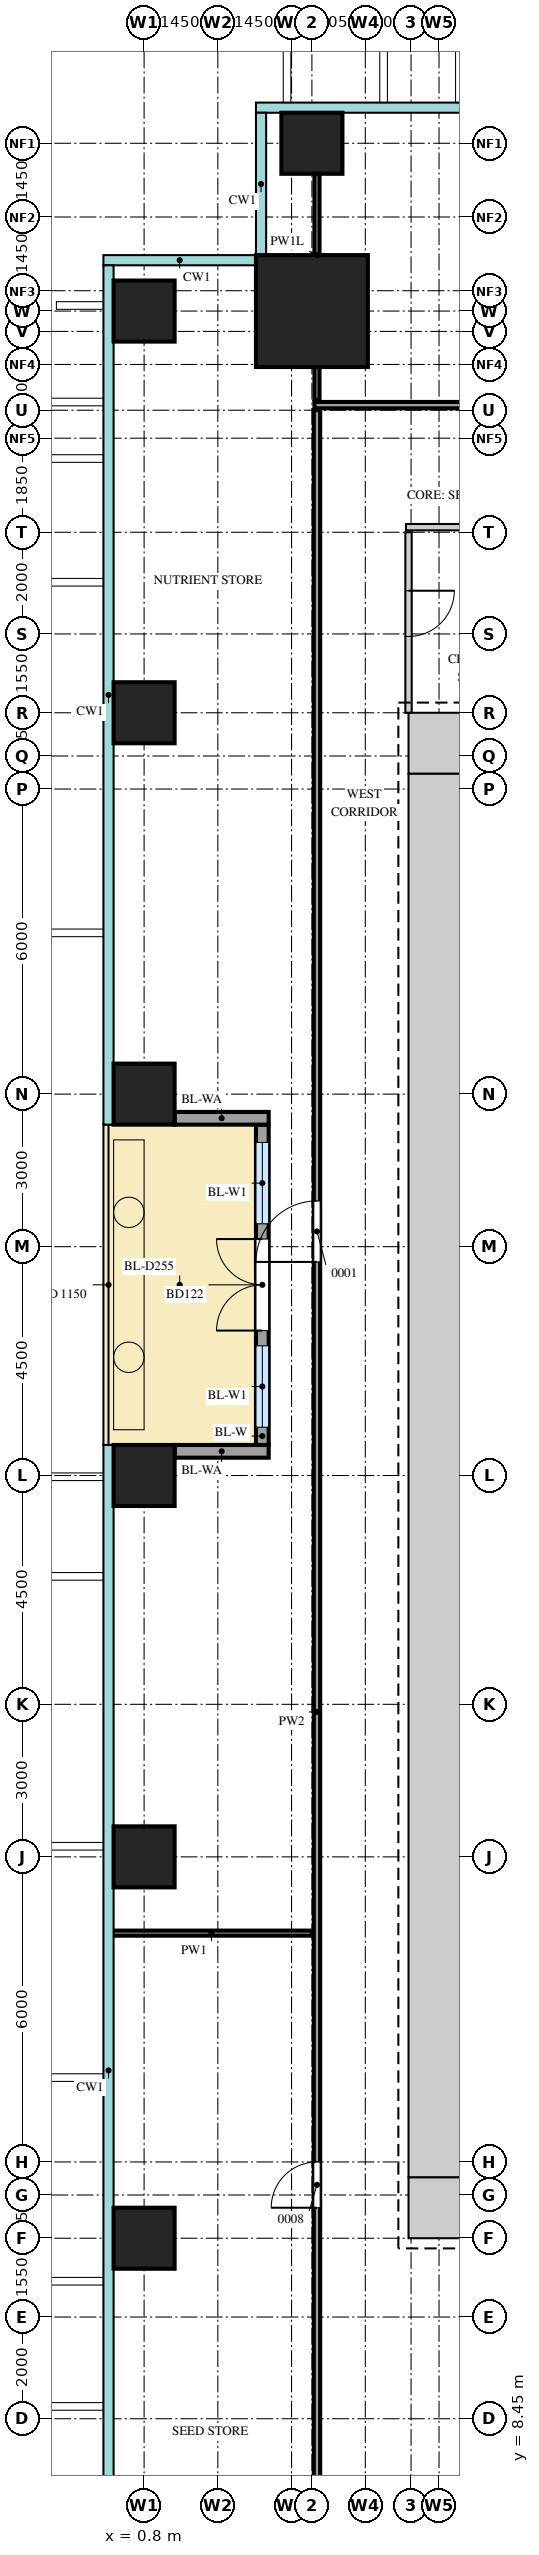
"""IFC4 building model, lengths in metres.
Left out: names, types, materials, properties, quantities, classifications, styles, units other than length and angle.
Written with IfcOpenShell. Run it as: python <this file> out.ifc"""

import sys

from ifc_helpers import new_model, si_unit, direction, frame, frame_2d, origin, origin_2d, place, context, subcontext, project, spatial, rectangle, extrude, source, transform, mapped, element, fill, save


model = new_model("IFC4")
c1 = context("Model", 3, precision=1e-05, world=origin(), true_north=direction((0.0, 1.0)))
c2 = subcontext(c1, "Body", "Model", "MODEL_VIEW")
j1 = project(units=[si_unit("LENGTHUNIT", "METRE"), si_unit("PLANEANGLEUNIT", "RADIAN")], contexts=[c1])
p1 = place(None, origin())
s1 = spatial("IfcSite", under=j1, at=p1, CompositionType="ELEMENT")
p2 = place(p1, origin())
s2 = spatial("IfcBuilding", under=s1, at=p2, CompositionType="ELEMENT")
p3 = place(p2, frame((0.0, 0.0, 60.0)))
s3 = spatial("IfcBuildingStorey", under=s2, at=p3, CompositionType="ELEMENT", Elevation=60.0)
m1 = source(origin(), c2, "Body", "SweptSolid", [
    extrude(rectangle(XDim=1.2, YDim=1.2, at=frame_2d((0.6, 0.0))), origin(), (0.0, 0.0, 1.0), 4.2),
])
for number, where, z_axis, x_axis in (
    (1, (6.0, 41.4, 0.0), (0.0, 0.0, 1.0), (1.0, 0.0, 0.0)),
    (2, (6.0, 12.6, 0.0), (0.0, 0.0, 1.0), (1.0, 0.0, 0.0)),
):
    element("IfcWall", number, at=place(p3, frame(where, z_axis=z_axis, x_axis=x_axis)), inside=s3, PredefinedType="SHEAR", context=c2, shape_type="MappedRepresentation", body=[
        mapped(m1, transform((0.0, 0.0, 0.0))),
    ])
m2 = source(origin(), c2, "Body", "SweptSolid", [
    extrude(rectangle(XDim=27.6, YDim=1.2, at=frame_2d((13.8, 0.0))), origin(), (0.0, 0.0, 1.0), 4.2),
])
p4 = place(p3, frame((6.6, 13.2, 0.0), z_axis=(0.0, 0.0, 1.0), x_axis=(0.0, 1.0, 0.0)))
e3 = element("IfcWall", 3, at=p4, inside=s3, PredefinedType="SHEAR", context=c2, shape_type="MappedRepresentation", body=[
    mapped(m2, transform((0.0, 0.0, 0.0))),
])
m3 = source(origin(), c2, "Body", "SweptSolid", [
    extrude(rectangle(XDim=2.2, YDim=2.2, at=origin_2d()), origin(), (0.0, 0.0, 1.0), 4.5),
])
p5 = place(p3, frame((4.1, 49.9, 0.0), z_axis=(0.0, 0.0, 1.0), x_axis=(1.0, 0.0, 0.0)))
e4 = element("IfcColumn", 4, at=p5, inside=s3, PredefinedType="COLUMN", context=c2, shape_type="MappedRepresentation", body=[
    mapped(m3, transform((0.0, 0.0, 0.0))),
])
m4 = source(origin(), c2, "Body", "SweptSolid", [
    extrude(rectangle(XDim=1.2, YDim=1.2, at=origin_2d()), origin(), (0.0, 0.0, 1.0), 4.2),
])
for number, where, z_axis, x_axis in (
    (5, (4.1, 53.2, 0.0), (0.0, 0.0, 1.0), (1.0, 0.0, 0.0)),
    (6, (0.8, 12.0, 0.0), (0.0, 0.0, 1.0), (1.0, 0.0, 0.0)),
    (7, (0.8, 19.5, 0.0), (0.0, 0.0, 1.0), (1.0, 0.0, 0.0)),
    (8, (0.8, 27.0, 0.0), (0.0, 0.0, 1.0), (1.0, 0.0, 0.0)),
    (9, (0.8, 34.5, 0.0), (0.0, 0.0, 1.0), (1.0, 0.0, 0.0)),
    (10, (0.8, 42.0, 0.0), (0.0, 0.0, 1.0), (1.0, 0.0, 0.0)),
    (11, (0.8, 49.9, 0.0), (0.0, 0.0, 1.0), (1.0, 0.0, 0.0)),
):
    element("IfcColumn", number, at=place(p3, frame(where, z_axis=z_axis, x_axis=x_axis)), inside=s3, PredefinedType="COLUMN", context=c2, shape_type="MappedRepresentation", body=[
        mapped(m4, transform((0.0, 0.0, 0.0))),
    ])
m5 = source(origin(), c2, "Body", "SweptSolid", [
    extrude(rectangle(XDim=6.3, YDim=0.25, at=frame_2d((3.15, 0.0))), origin(), (0.0, 0.0, 1.0), 4.2),
])
p6 = place(p3, frame((3.125, 27.6, 0.0), z_axis=(0.0, 0.0, 1.0), x_axis=(0.0, 1.0, 0.0)))
e12 = element("IfcWall", 12, at=p6, inside=s3, PredefinedType="SOLIDWALL", context=c2, shape_type="MappedRepresentation", body=[
    mapped(m5, transform((0.0, 0.0, 0.0))),
])
m6 = source(origin(), c2, "Body", "SweptSolid", [
    extrude(rectangle(XDim=1.6, YDim=2.4, at=frame_2d((0.8, 1.2))), frame((0.0, 0.135, 0.0), z_axis=(0.0, -1.0, 0.0), x_axis=(1.0, 0.0, 0.0)), (0.0, 0.0, 1.0), 0.27),
])
p7 = place(p6, frame((0.35, 0.0, 0.0)))
e13 = element("IfcOpeningElement", 13, at=p7, cuts=e12, PredefinedType="OPENING", context=c2, shape_type="MappedRepresentation", body=[
    mapped(m6, transform((0.0, 0.0, 0.0))),
])
p8 = place(p6, frame((4.35, 0.0, 0.0)))
e14 = element("IfcOpeningElement", 14, at=p8, cuts=e12, PredefinedType="OPENING", context=c2, shape_type="MappedRepresentation", body=[
    mapped(m6, transform((0.0, 0.0, 0.0))),
])
m7 = source(origin(), c2, "Body", "SweptSolid", [
    extrude(rectangle(XDim=1.8, YDim=2.4, at=frame_2d((0.9, 1.2))), frame((0.0, 0.135, 0.0), z_axis=(0.0, -1.0, 0.0), x_axis=(1.0, 0.0, 0.0)), (0.0, 0.0, 1.0), 0.27),
])
p9 = place(p6, frame((2.25, 0.0, 0.0)))
e15 = element("IfcOpeningElement", 15, at=p9, cuts=e12, PredefinedType="OPENING", context=c2, shape_type="MappedRepresentation", body=[
    mapped(m7, transform((0.0, 0.0, 0.0))),
])
m8 = source(origin(), c2, "Body", "SweptSolid", [
    extrude(rectangle(XDim=1.85, YDim=0.25, at=frame_2d((0.925, 0.0))), origin(), (0.0, 0.0, 1.0), 3.9),
])
for number, where, z_axis, x_axis in (
    (16, (1.4, 27.475, 0.0), (0.0, 0.0, 1.0), (1.0, 0.0, 0.0)),
    (17, (1.4, 34.025, 0.0), (0.0, 0.0, 1.0), (1.0, 0.0, 0.0)),
):
    element("IfcWall", number, at=place(p3, frame(where, z_axis=z_axis, x_axis=x_axis)), inside=s3, PredefinedType="SOLIDWALL", context=c2, shape_type="MappedRepresentation", body=[
        mapped(m8, transform((0.0, 0.0, 0.0))),
    ])
m9 = source(origin(), c2, "Body", "SweptSolid", [
    extrude(rectangle(XDim=41.8, YDim=0.125, at=frame_2d((20.9, 0.0))), origin(), (0.0, 0.0, 1.0), 4.3),
])
p10 = place(p3, frame((4.2, 6.15, 0.0), z_axis=(0.0, 0.0, 1.0), x_axis=(0.0, 1.0, 0.0)))
e18 = element("IfcWall", 18, at=p10, inside=s3, PredefinedType="PARTITIONING", context=c2, shape_type="MappedRepresentation", body=[
    mapped(m9, transform((0.0, 0.0, 0.0))),
])
m10 = source(origin(), c2, "Body", "SweptSolid", [
    extrude(rectangle(XDim=0.9, YDim=2.1, at=frame_2d((0.45, 1.05))), frame((0.0, 0.073, 0.0), z_axis=(0.0, -1.0, 0.0), x_axis=(1.0, 0.0, 0.0)), (0.0, 0.0, 1.0), 0.145),
])
p11 = place(p10, frame((6.45, 0.0, 0.0)))
e19 = element("IfcOpeningElement", 19, at=p11, cuts=e18, PredefinedType="OPENING", context=c2, shape_type="MappedRepresentation", body=[
    mapped(m10, transform((0.0, 0.0, 0.0))),
])
m11 = source(origin(), c2, "Body", "SweptSolid", [
    extrude(rectangle(XDim=1.2, YDim=2.1, at=frame_2d((0.6, 1.05))), frame((0.0, 0.073, 0.0), z_axis=(0.0, -1.0, 0.0), x_axis=(1.0, 0.0, 0.0)), (0.0, 0.0, 1.0), 0.145),
])
p12 = place(p10, frame((25.05, 0.0, 0.0)))
e20 = element("IfcOpeningElement", 20, at=p12, cuts=e18, PredefinedType="OPENING", context=c2, shape_type="MappedRepresentation", body=[
    mapped(m11, transform((0.0, 0.0, 0.0))),
])
m12 = source(origin(), c2, "Body", "SweptSolid", [
    extrude(rectangle(XDim=3.95, YDim=0.1, at=frame_2d((1.975, 0.0))), origin(), (0.0, 0.0, 1.0), 4.3),
])
p13 = place(p3, frame((0.15, 18.0, 0.0), z_axis=(0.0, 0.0, 1.0), x_axis=(1.0, 0.0, 0.0)))
e21 = element("IfcWall", 21, at=p13, inside=s3, PredefinedType="PARTITIONING", context=c2, shape_type="MappedRepresentation", body=[
    mapped(m12, transform((0.0, 0.0, 0.0))),
])
m13 = source(origin(), c2, "Body", "SweptSolid", [
    extrude(rectangle(XDim=3.55, YDim=0.125, at=frame_2d((1.775, 0.0))), origin(), (0.0, 0.0, 1.0), 4.3),
])
p14 = place(p3, frame((6.0, 42.0, 0.0), z_axis=(0.0, 0.0, 1.0), x_axis=(0.0, 1.0, 0.0)))
e22 = element("IfcWall", 22, at=p14, inside=s3, PredefinedType="PARTITIONING", context=c2, shape_type="MappedRepresentation", body=[
    mapped(m13, transform((0.0, 0.0, 0.0))),
])
p15 = place(p14, frame((1.5, 0.0, 0.0)))
e23 = element("IfcOpeningElement", 23, at=p15, cuts=e22, PredefinedType="OPENING", context=c2, shape_type="MappedRepresentation", body=[
    mapped(m10, transform((0.0, 0.0, 0.0))),
])
m14 = source(origin(), c2, "Body", "SweptSolid", [
    extrude(rectangle(XDim=7.95, YDim=0.125, at=frame_2d((3.975, 0.0))), origin(), (0.0, 0.0, 1.0), 4.3),
])
p16 = place(p3, frame((5.95, 45.65, 0.0), z_axis=(0.0, 0.0, 1.0), x_axis=(1.0, 0.0, 0.0)))
e24 = element("IfcWall", 24, at=p16, inside=s3, PredefinedType="PARTITIONING", context=c2, shape_type="MappedRepresentation", body=[
    mapped(m14, transform((0.0, 0.0, 0.0))),
])
p17 = place(p16, frame((3.3, 0.0, 0.0)))
e25 = element("IfcOpeningElement", 25, at=p17, cuts=e24, PredefinedType="OPENING", context=c2, shape_type="MappedRepresentation", body=[
    mapped(m10, transform((0.0, 0.0, 0.0))),
])
p18 = place(p16, frame((6.1, 0.0, 0.0)))
e26 = element("IfcOpeningElement", 26, at=p18, cuts=e24, PredefinedType="OPENING", context=c2, shape_type="MappedRepresentation", body=[
    mapped(m10, transform((0.0, 0.0, 0.0))),
])
m15 = source(origin(), c2, "Body", "SweptSolid", [
    extrude(rectangle(XDim=26.6, YDim=0.125, at=frame_2d((13.3, 0.0))), origin(), (0.0, 0.0, 1.0), 4.3),
])
p19 = place(p3, frame((4.15, 48.05, 0.0), z_axis=(0.0, 0.0, 1.0), x_axis=(1.0, 0.0, 0.0)))
e27 = element("IfcWall", 27, at=p19, inside=s3, PredefinedType="PARTITIONING", context=c2, shape_type="MappedRepresentation", body=[
    mapped(m15, transform((0.0, 0.0, 0.0))),
])
p20 = place(p19, frame((7.25, 0.0, 0.0)))
e28 = element("IfcOpeningElement", 28, at=p20, cuts=e27, PredefinedType="OPENING", context=c2, shape_type="MappedRepresentation", body=[
    mapped(m10, transform((0.0, 0.0, 0.0))),
])
p21 = place(p19, frame((20.5, 0.0, 0.0)))
e29 = element("IfcOpeningElement", 29, at=p21, cuts=e27, PredefinedType="OPENING", context=c2, shape_type="MappedRepresentation", body=[
    mapped(m10, transform((0.0, 0.0, 0.0))),
])
m16 = source(origin(), c2, "Body", "SweptSolid", [
    extrude(rectangle(XDim=5.7, YDim=0.1, at=frame_2d((2.85, 0.0))), origin(), (0.0, 0.0, 1.0), 3.6),
])
p22 = place(p3, frame((4.2, 48.15, 0.0), z_axis=(0.0, 0.0, 1.0), x_axis=(0.0, 1.0, 0.0)))
e30 = element("IfcWall", 30, at=p22, inside=s3, PredefinedType="PARTITIONING", context=c2, shape_type="MappedRepresentation", body=[
    mapped(m16, transform((0.0, 0.0, 0.0))),
])
m17 = source(origin(), c2, "Body", "SweptSolid", [
    extrude(rectangle(XDim=1.6, YDim=2.4, at=frame_2d((0.8, 1.2))), frame((0.0, 0.03, 0.0), z_axis=(0.0, -1.0, 0.0), x_axis=(1.0, 0.0, 0.0)), (0.0, 0.0, 1.0), 0.06),
])
p23 = place(p7, origin())
e31 = element("IfcWindow", 31, at=p23, inside=s3, PartitioningType="SINGLE_PANEL", PredefinedType="WINDOW", context=c2, shape_type="MappedRepresentation", body=[
    mapped(m17, transform((0.0, 0.0, 0.0))),
])
fill(e13, e31)
p24 = place(p8, origin())
e32 = element("IfcWindow", 32, at=p24, inside=s3, PartitioningType="SINGLE_PANEL", PredefinedType="WINDOW", context=c2, shape_type="MappedRepresentation", body=[
    mapped(m17, transform((0.0, 0.0, 0.0))),
])
fill(e14, e32)
m18 = source(origin(), c2, "Body", "SweptSolid", [
    extrude(rectangle(XDim=1.8, YDim=2.4, at=frame_2d((0.9, 1.2))), frame((0.0, 0.025, 0.0), z_axis=(0.0, -1.0, 0.0), x_axis=(1.0, 0.0, 0.0)), (0.0, 0.0, 1.0), 0.05),
])
p25 = place(p9, origin())
e33 = element("IfcDoor", 33, at=p25, inside=s3, OperationType="DOUBLE_DOOR_DOUBLE_SWING", PredefinedType="DOOR", context=c2, shape_type="MappedRepresentation", body=[
    mapped(m18, transform((0.0, 0.0, 0.0))),
])
fill(e15, e33)
m19 = source(origin(), c2, "Body", "SweptSolid", [
    extrude(rectangle(XDim=0.9, YDim=2.1, at=frame_2d((0.45, 1.05))), frame((0.0, 0.025, 0.0), z_axis=(0.0, -1.0, 0.0), x_axis=(1.0, 0.0, 0.0)), (0.0, 0.0, 1.0), 0.05),
])
p26 = place(p15, origin())
e34 = element("IfcDoor", 34, at=p26, inside=s3, OperationType="SINGLE_SWING_RIGHT", PredefinedType="DOOR", context=c2, shape_type="MappedRepresentation", body=[
    mapped(m19, transform((0.0, 0.0, 0.0))),
])
fill(e23, e34)
p27 = place(p11, origin())
e35 = element("IfcDoor", 35, at=p27, inside=s3, OperationType="SINGLE_SWING_RIGHT", PredefinedType="DOOR", context=c2, shape_type="MappedRepresentation", body=[
    mapped(m19, transform((0.0, 0.0, 0.0))),
])
fill(e19, e35)
m20 = source(origin(), c2, "Body", "SweptSolid", [
    extrude(rectangle(XDim=1.2, YDim=2.1, at=frame_2d((0.6, 1.05))), frame((0.0, 0.025, 0.0), z_axis=(0.0, -1.0, 0.0), x_axis=(1.0, 0.0, 0.0)), (0.0, 0.0, 1.0), 0.05),
])
p28 = place(p12, origin())
e36 = element("IfcDoor", 36, at=p28, inside=s3, OperationType="SINGLE_SWING_RIGHT", PredefinedType="DOOR", context=c2, shape_type="MappedRepresentation", body=[
    mapped(m20, transform((0.0, 0.0, 0.0))),
])
fill(e20, e36)
save(model, sys.argv[1])
